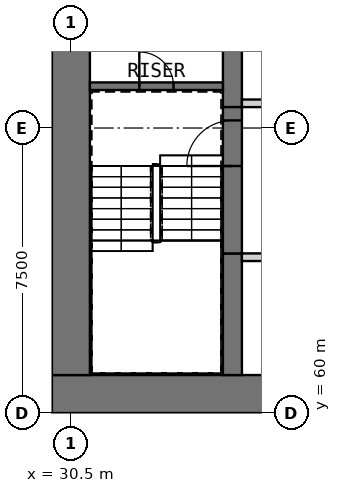
"""IFC4 building model, lengths in metres.
Left out: names, types, materials, properties, quantities, classifications, styles, units other than length and angle.
Written with IfcOpenShell. Run it as: python <this file> out.ifc"""

import sys

from ifc_helpers import new_model, si_unit, direction, frame, frame_2d, origin, place, context, subcontext, project, spatial, rectangle, extrude, element, fill, save


model = new_model("IFC4")
c1 = context("Model", 3, precision=1e-05, world=origin(), true_north=direction((0.0, 1.0)))
c2 = subcontext(c1, "Body", "Model", "MODEL_VIEW")
j1 = project(units=[si_unit("LENGTHUNIT", "METRE"), si_unit("PLANEANGLEUNIT", "RADIAN")], contexts=[c1])
p1 = place(None, origin())
s1 = spatial("IfcSite", under=j1, at=p1, CompositionType="ELEMENT")
p2 = place(p1, origin())
s2 = spatial("IfcBuilding", under=s1, at=p2, CompositionType="ELEMENT")
p3 = place(p2, frame((0.0, 0.0, 118.7)))
s3 = spatial("IfcBuildingStorey", under=s2, at=p3, CompositionType="ELEMENT", Elevation=118.7)
p4 = place(p3, frame((30.0, 60.5, 0.0), z_axis=(0.0, 0.0, 1.0), x_axis=(1.0, 0.0, 0.0)))
e1 = element("IfcWall", 1, at=p4, inside=s3, PredefinedType="SHEAR", context=c2, shape_type="SweptSolid", body=[
    extrude(rectangle(XDim=30.0, YDim=1.0, at=frame_2d((15.0, 0.0))), origin(), (0.0, 0.0, 1.0), 5.5),
])
p5 = place(p4, frame((21.9, 0.0, 0.0)))
e2 = element("IfcOpeningElement", 2, at=p5, cuts=e1, PredefinedType="OPENING", context=c2, shape_type="SweptSolid", body=[
    extrude(rectangle(XDim=1.8, YDim=2.1, at=frame_2d((0.9, 1.05))), frame((0.0, 0.51, 0.0), z_axis=(0.0, -1.0, 0.0), x_axis=(1.0, 0.0, 0.0)), (0.0, 0.0, 1.0), 1.02),
])
p6 = place(p4, frame((26.5, 0.0, 0.0)))
e3 = element("IfcOpeningElement", 3, at=p6, cuts=e1, PredefinedType="OPENING", context=c2, shape_type="SweptSolid", body=[
    extrude(rectangle(XDim=1.2, YDim=2.1, at=frame_2d((0.6, 1.05))), frame((0.0, 0.51, 0.0), z_axis=(0.0, -1.0, 0.0), x_axis=(1.0, 0.0, 0.0)), (0.0, 0.0, 1.0), 1.02),
])
p7 = place(p3, frame((30.5, 61.0, 0.0), z_axis=(0.0, 0.0, 1.0), x_axis=(0.0, 1.0, 0.0)))
e4 = element("IfcWall", 4, at=p7, inside=s3, PredefinedType="SHEAR", context=c2, shape_type="SweptSolid", body=[
    extrude(rectangle(XDim=20.5, YDim=1.0, at=frame_2d((10.25, 0.0))), origin(), (0.0, 0.0, 1.0), 5.5),
])
p8 = place(p3, frame((34.75, 61.0, 0.0), z_axis=(0.0, 0.0, 1.0), x_axis=(0.0, 1.0, 0.0)))
e5 = element("IfcWall", 5, at=p8, inside=s3, PredefinedType="SHEAR", context=c2, shape_type="SweptSolid", body=[
    extrude(rectangle(XDim=3.2, YDim=0.5, at=frame_2d((1.6, 0.0))), origin(), (0.0, 0.0, 1.0), 5.5),
])
p9 = place(p3, frame((34.75, 68.05, 0.0), z_axis=(0.0, 0.0, 1.0), x_axis=(0.0, 1.0, 0.0)))
e6 = element("IfcWall", 6, at=p9, inside=s3, PredefinedType="SHEAR", context=c2, shape_type="SweptSolid", body=[
    extrude(rectangle(XDim=6.4, YDim=0.5, at=frame_2d((3.2, 0.0))), origin(), (0.0, 0.0, 1.0), 5.5),
])
for number, where, z_axis, x_axis in (
    (7, (35.0, 64.1, 0.0), (0.0, 0.0, 1.0), (1.0, 0.0, 0.0)),
    (8, (35.0, 68.15, 0.0), (0.0, 0.0, 1.0), (1.0, 0.0, 0.0)),
):
    element("IfcWall", number, at=place(p3, frame(where, z_axis=z_axis, x_axis=x_axis)), inside=s3, PredefinedType="SOLIDWALL", context=c2, shape_type="SweptSolid", body=[
        extrude(rectangle(XDim=13.0, YDim=0.2, at=frame_2d((6.5, 0.0))), origin(), (0.0, 0.0, 1.0), 5.5),
    ])
p10 = place(p3, frame((34.75, 64.2, 0.0), z_axis=(0.0, 0.0, 1.0), x_axis=(0.0, 1.0, 0.0)))
e9 = element("IfcWall", 9, at=p10, inside=s3, PredefinedType="SOLIDWALL", context=c2, shape_type="SweptSolid", body=[
    extrude(rectangle(XDim=3.85, YDim=0.5, at=frame_2d((1.925, 0.0))), origin(), (0.0, 0.0, 1.0), 4.3),
])
p11 = place(p10, frame((2.3, 0.0, 0.0)))
e10 = element("IfcOpeningElement", 10, at=p11, cuts=e9, PredefinedType="OPENING", context=c2, shape_type="SweptSolid", body=[
    extrude(rectangle(XDim=1.2, YDim=2.1, at=frame_2d((0.6, 1.05))), frame((0.0, 0.26, 0.0), z_axis=(0.0, -1.0, 0.0), x_axis=(1.0, 0.0, 0.0)), (0.0, 0.0, 1.0), 0.52),
])
p12 = place(p3, frame((31.0, 68.6, 0.0), z_axis=(0.0, 0.0, 1.0), x_axis=(1.0, 0.0, 0.0)))
e11 = element("IfcWall", 11, at=p12, inside=s3, PredefinedType="SOLIDWALL", context=c2, shape_type="SweptSolid", body=[
    extrude(rectangle(XDim=3.5, YDim=0.2, at=frame_2d((1.75, 0.0))), origin(), (0.0, 0.0, 1.0), 5.2),
])
p13 = place(p12, frame((1.3, 0.0, 0.0)))
e12 = element("IfcOpeningElement", 12, at=p13, cuts=e11, PredefinedType="OPENING", context=c2, shape_type="SweptSolid", body=[
    extrude(rectangle(XDim=0.9, YDim=2.1, at=frame_2d((0.45, 1.05))), frame((0.0, 0.11, 0.0), z_axis=(0.0, -1.0, 0.0), x_axis=(1.0, 0.0, 0.0)), (0.0, 0.0, 1.0), 0.22),
])
p14 = place(p11, origin())
e13 = element("IfcDoor", 13, at=p14, inside=s3, OperationType="SINGLE_SWING_LEFT", PredefinedType="DOOR", context=c2, shape_type="SweptSolid", body=[
    extrude(rectangle(XDim=1.2, YDim=2.1, at=frame_2d((0.6, 1.05))), frame((0.0, 0.025, 0.0), z_axis=(0.0, -1.0, 0.0), x_axis=(1.0, 0.0, 0.0)), (0.0, 0.0, 1.0), 0.05),
])
fill(e10, e13)
p15 = place(p13, origin())
e14 = element("IfcDoor", 14, at=p15, inside=s3, OperationType="SINGLE_SWING_LEFT", PredefinedType="DOOR", context=c2, shape_type="SweptSolid", body=[
    extrude(rectangle(XDim=0.9, YDim=2.1, at=frame_2d((0.45, 1.05))), frame((0.0, 0.025, 0.0), z_axis=(0.0, -1.0, 0.0), x_axis=(1.0, 0.0, 0.0)), (0.0, 0.0, 1.0), 0.05),
])
fill(e12, e14)
save(model, sys.argv[1])
